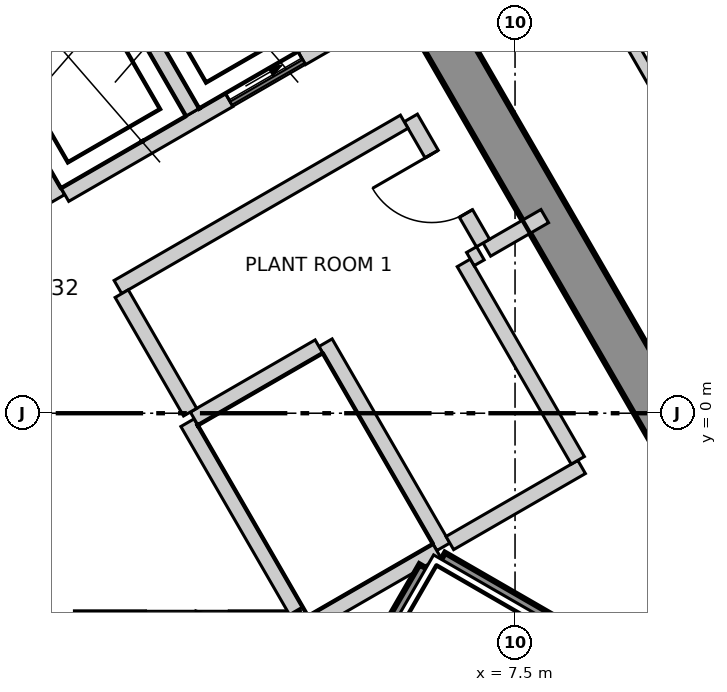
"""IFC4 building model, lengths in metres.
Left out: names, types, materials, properties, quantities, classifications, styles, units other than length and angle.
Written with IfcOpenShell. Run it as: python <this file> out.ifc"""

import sys

from ifc_helpers import new_model, si_unit, direction, frame, frame_2d, origin, place, context, subcontext, project, spatial, polyline, rectangle, outline, extrude, element, fill, save


model = new_model("IFC4")
c1 = context("Model", 3, precision=1e-05, world=origin(), true_north=direction((0.0, 1.0)))
c2 = subcontext(c1, "Body", "Model", "MODEL_VIEW")
j1 = project(units=[si_unit("LENGTHUNIT", "METRE"), si_unit("PLANEANGLEUNIT", "RADIAN")], contexts=[c1])
p1 = place(None, origin())
s1 = spatial("IfcSite", under=j1, at=p1, CompositionType="ELEMENT")
p2 = place(p1, origin())
s2 = spatial("IfcBuilding", under=s1, at=p2, CompositionType="ELEMENT")
p3 = place(p2, frame((0.0, 0.0, 268.3)))
s3 = spatial("IfcBuildingStorey", under=s2, at=p3, CompositionType="ELEMENT", Elevation=268.3)
p4 = place(p3, frame((12.384, -5.15, -0.3), z_axis=(0.0, 0.0, 1.0), x_axis=(-0.500000539815, 0.866025092122, 0.0)))
e1 = element("IfcWall", 1, at=p4, inside=s3, PredefinedType="SHEAR", context=c2, shape_type="SweptSolid", body=[
    extrude(outline(polyline([(-0.173, -0.301), (1.795, -0.301), (3.763, -0.301), (5.731, -0.301), (7.7, -0.301), (9.668, -0.301), (11.636, -0.301), (13.604, -0.3), (15.573, -0.3), (17.541, -0.3), (19.509, -0.3), (21.477, -0.3), (21.131, 0.3), (19.226, 0.3), (17.321, 0.3), (15.415, 0.3), (13.51, 0.3), (11.605, 0.3), (9.699, 0.3), (7.794, 0.3), (5.889, 0.3), (3.984, 0.3), (2.078, 0.3), (0.173, 0.3), (-0.173, -0.301)])), origin(), (0.0, 0.0, 1.0), 3.6),
])
p5 = place(p4, frame((15.627, 0.0, 0.3)))
e2 = element("IfcOpeningElement", 2, at=p5, cuts=e1, PredefinedType="OPENING", context=c2, shape_type="SweptSolid", body=[
    extrude(rectangle(XDim=0.9, YDim=2.1, at=frame_2d((0.45, 1.05))), frame((0.0, 0.31, 0.0), z_axis=(0.0, -1.0, 0.0), x_axis=(1.0, 0.0, 0.0)), (0.0, 0.0, 1.0), 0.621),
])
p6 = place(p4, frame((4.026, 0.0, 0.3)))
e3 = element("IfcOpeningElement", 3, at=p6, cuts=e1, PredefinedType="OPENING", context=c2, shape_type="SweptSolid", body=[
    extrude(rectangle(XDim=0.9, YDim=2.1, at=frame_2d((0.45, 1.05))), frame((0.0, 0.31, 0.0), z_axis=(0.0, -1.0, 0.0), x_axis=(1.0, 0.0, 0.0)), (0.0, 0.0, 1.0), 0.621),
])
p7 = place(p3, frame((26.205, -12.154, 0.0), z_axis=(0.0, 0.0, 1.0), x_axis=(-0.49999909388, 0.866025926932, 0.0)))
e4 = element("IfcWall", 4, at=p7, inside=s3, PredefinedType="ELEMENTEDWALL", context=c2, shape_type="SweptSolid", body=[
    extrude(rectangle(XDim=47.236, YDim=0.2, at=frame_2d((23.618, 0.0))), origin(), (0.0, 0.0, 1.0), 3.3),
])
p8 = place(p7, frame((2.243, 0.0, 0.9)))
e5 = element("IfcOpeningElement", 5, at=p8, cuts=e4, PredefinedType="OPENING", context=c2, shape_type="SweptSolid", body=[
    extrude(rectangle(XDim=3.7, YDim=2.2, at=frame_2d((1.85, 1.1))), frame((0.0, 0.11, 0.0), z_axis=(0.0, -1.0, 0.0), x_axis=(1.0, 0.0, 0.0)), (0.0, 0.0, 1.0), 0.22),
])
p9 = place(p7, frame((7.825, 0.0, 0.9)))
e6 = element("IfcOpeningElement", 6, at=p9, cuts=e4, PredefinedType="OPENING", context=c2, shape_type="SweptSolid", body=[
    extrude(rectangle(XDim=3.7, YDim=2.2, at=frame_2d((1.85, 1.1))), frame((0.0, 0.11, 0.0), z_axis=(0.0, -1.0, 0.0), x_axis=(1.0, 0.0, 0.0)), (0.0, 0.0, 1.0), 0.22),
])
p10 = place(p7, frame((13.406, 0.0, 0.9)))
e7 = element("IfcOpeningElement", 7, at=p10, cuts=e4, PredefinedType="OPENING", context=c2, shape_type="SweptSolid", body=[
    extrude(rectangle(XDim=3.7, YDim=2.2, at=frame_2d((1.85, 1.1))), frame((0.0, 0.11, 0.0), z_axis=(0.0, -1.0, 0.0), x_axis=(1.0, 0.0, 0.0)), (0.0, 0.0, 1.0), 0.22),
])
p11 = place(p7, frame((18.987, 0.0, 0.9)))
e8 = element("IfcOpeningElement", 8, at=p11, cuts=e4, PredefinedType="OPENING", context=c2, shape_type="SweptSolid", body=[
    extrude(rectangle(XDim=3.7, YDim=2.2, at=frame_2d((1.85, 1.1))), frame((0.0, 0.11, 0.0), z_axis=(0.0, -1.0, 0.0), x_axis=(1.0, 0.0, 0.0)), (0.0, 0.0, 1.0), 0.22),
])
p12 = place(p7, frame((24.569, 0.0, 0.9)))
e9 = element("IfcOpeningElement", 9, at=p12, cuts=e4, PredefinedType="OPENING", context=c2, shape_type="SweptSolid", body=[
    extrude(rectangle(XDim=3.7, YDim=2.2, at=frame_2d((1.85, 1.1))), frame((0.0, 0.11, 0.0), z_axis=(0.0, -1.0, 0.0), x_axis=(1.0, 0.0, 0.0)), (0.0, 0.0, 1.0), 0.22),
])
p13 = place(p7, frame((30.15, 0.0, 0.9)))
e10 = element("IfcOpeningElement", 10, at=p13, cuts=e4, PredefinedType="OPENING", context=c2, shape_type="SweptSolid", body=[
    extrude(rectangle(XDim=3.7, YDim=2.2, at=frame_2d((1.85, 1.1))), frame((0.0, 0.11, 0.0), z_axis=(0.0, -1.0, 0.0), x_axis=(1.0, 0.0, 0.0)), (0.0, 0.0, 1.0), 0.22),
])
p14 = place(p7, frame((35.732, 0.0, 0.9)))
e11 = element("IfcOpeningElement", 11, at=p14, cuts=e4, PredefinedType="OPENING", context=c2, shape_type="SweptSolid", body=[
    extrude(rectangle(XDim=3.7, YDim=2.2, at=frame_2d((1.85, 1.1))), frame((0.0, 0.11, 0.0), z_axis=(0.0, -1.0, 0.0), x_axis=(1.0, 0.0, 0.0)), (0.0, 0.0, 1.0), 0.22),
])
p15 = place(p7, frame((41.313, 0.0, 0.9)))
e12 = element("IfcOpeningElement", 12, at=p15, cuts=e4, PredefinedType="OPENING", context=c2, shape_type="SweptSolid", body=[
    extrude(rectangle(XDim=3.7, YDim=2.2, at=frame_2d((1.85, 1.1))), frame((0.0, 0.11, 0.0), z_axis=(0.0, -1.0, 0.0), x_axis=(1.0, 0.0, 0.0)), (0.0, 0.0, 1.0), 0.22),
])
p16 = place(p3, frame((0.075, 20.37, 0.0), z_axis=(0.0, 0.0, 1.0), x_axis=(0.499988971979, -0.866031770721, 0.0)))
e13 = element("IfcWall", 13, at=p16, inside=s3, PredefinedType="PARTITIONING", context=c2, shape_type="SweptSolid", body=[
    extrude(rectangle(XDim=35.207, YDim=0.15, at=frame_2d((17.604, 0.0))), origin(), (0.0, 0.0, 1.0), 3.3),
])
p17 = place(p16, frame((31.606, 0.0, 0.0)))
e14 = element("IfcOpeningElement", 14, at=p17, cuts=e13, PredefinedType="OPENING", context=c2, shape_type="SweptSolid", body=[
    extrude(rectangle(XDim=1.0, YDim=2.1, at=frame_2d((0.5, 1.05))), frame((0.0, 0.085, 0.0), z_axis=(0.0, -1.0, 0.0), x_axis=(1.0, 0.0, 0.0)), (0.0, 0.0, 1.0), 0.17),
])
p18 = place(p16, frame((24.316, 0.0, 0.0)))
e15 = element("IfcOpeningElement", 15, at=p18, cuts=e13, PredefinedType="OPENING", context=c2, shape_type="SweptSolid", body=[
    extrude(rectangle(XDim=1.0, YDim=2.1, at=frame_2d((0.5, 1.05))), frame((0.0, 0.085, 0.0), z_axis=(0.0, -1.0, 0.0), x_axis=(1.0, 0.0, 0.0)), (0.0, 0.0, 1.0), 0.17),
])
p19 = place(p16, frame((18.735, 0.0, 0.0)))
e16 = element("IfcOpeningElement", 16, at=p19, cuts=e13, PredefinedType="OPENING", context=c2, shape_type="SweptSolid", body=[
    extrude(rectangle(XDim=1.0, YDim=2.1, at=frame_2d((0.5, 1.05))), frame((0.0, 0.085, 0.0), z_axis=(0.0, -1.0, 0.0), x_axis=(1.0, 0.0, 0.0)), (0.0, 0.0, 1.0), 0.17),
])
p20 = place(p16, frame((8.154, 0.0, 0.0)))
e17 = element("IfcOpeningElement", 17, at=p20, cuts=e13, PredefinedType="OPENING", context=c2, shape_type="SweptSolid", body=[
    extrude(rectangle(XDim=1.0, YDim=2.1, at=frame_2d((0.5, 1.05))), frame((0.0, 0.085, 0.0), z_axis=(0.0, -1.0, 0.0), x_axis=(1.0, 0.0, 0.0)), (0.0, 0.0, 1.0), 0.17),
])
p21 = place(p16, frame((13.754, 0.0, 0.0)))
e18 = element("IfcOpeningElement", 18, at=p21, cuts=e13, PredefinedType="OPENING", context=c2, shape_type="SweptSolid", body=[
    extrude(rectangle(XDim=0.9, YDim=2.1, at=frame_2d((0.45, 1.05))), frame((0.0, 0.085, 0.0), z_axis=(0.0, -1.0, 0.0), x_axis=(1.0, 0.0, 0.0)), (0.0, 0.0, 1.0), 0.17),
])
p22 = place(p16, frame((11.554, 0.0, 0.0)))
e19 = element("IfcOpeningElement", 19, at=p22, cuts=e13, PredefinedType="OPENING", context=c2, shape_type="SweptSolid", body=[
    extrude(rectangle(XDim=0.9, YDim=2.1, at=frame_2d((0.45, 1.05))), frame((0.0, 0.085, 0.0), z_axis=(0.0, -1.0, 0.0), x_axis=(1.0, 0.0, 0.0)), (0.0, 0.0, 1.0), 0.17),
])
p23 = place(p16, frame((2.69, 0.0, 0.0)))
e20 = element("IfcOpeningElement", 20, at=p23, cuts=e13, PredefinedType="OPENING", context=c2, shape_type="SweptSolid", body=[
    extrude(rectangle(XDim=1.0, YDim=2.1, at=frame_2d((0.5, 1.05))), frame((0.0, 0.085, 0.0), z_axis=(0.0, -1.0, 0.0), x_axis=(1.0, 0.0, 0.0)), (0.0, 0.0, 1.0), 0.17),
])
p24 = place(p3, frame((1.703, -2.7, 0.0), z_axis=(0.0, 0.0, 1.0), x_axis=(1.0, 0.0, 0.0)))
e21 = element("IfcWall", 21, at=p24, inside=s3, PredefinedType="SOLIDWALL", context=c2, shape_type="SweptSolid", body=[
    extrude(rectangle(XDim=2.973, YDim=0.2, at=frame_2d((1.487, 0.0))), origin(), (0.0, 0.0, 1.0), 3.3),
])
p25 = place(p24, frame((0.936, 0.0, 0.0)))
e22 = element("IfcOpeningElement", 22, at=p25, cuts=e21, PredefinedType="OPENING", context=c2, shape_type="SweptSolid", body=[
    extrude(rectangle(XDim=1.1, YDim=2.1, at=frame_2d((0.55, 1.05))), frame((0.0, 0.11, 0.0), z_axis=(0.0, -1.0, 0.0), x_axis=(1.0, 0.0, 0.0)), (0.0, 0.0, 1.0), 0.22),
])
p26 = place(p3, frame((0.0, 5.4, 0.0), z_axis=(0.0, 0.0, 1.0), x_axis=(0.500103862429, -0.865965430478, 0.0)))
e23 = element("IfcWall", 23, at=p26, inside=s3, PredefinedType="SOLIDWALL", context=c2, shape_type="SweptSolid", body=[
    extrude(rectangle(XDim=2.973, YDim=0.2, at=frame_2d((1.487, 0.0))), origin(), (0.0, 0.0, 1.0), 3.3),
])
p27 = place(p26, frame((0.937, 0.0, 0.0)))
e24 = element("IfcOpeningElement", 24, at=p27, cuts=e23, PredefinedType="OPENING", context=c2, shape_type="SweptSolid", body=[
    extrude(rectangle(XDim=1.1, YDim=2.1, at=frame_2d((0.55, 1.05))), frame((0.0, 0.11, 0.0), z_axis=(0.0, -1.0, 0.0), x_axis=(1.0, 0.0, 0.0)), (0.0, 0.0, 1.0), 0.22),
])
p28 = place(p3, frame((3.19, -0.125, 0.0), z_axis=(0.0, 0.0, 1.0), x_axis=(0.499988658015, -0.866031951983, 0.0)))
e25 = element("IfcWall", 25, at=p28, inside=s3, PredefinedType="SOLIDWALL", context=c2, shape_type="SweptSolid", body=[
    extrude(rectangle(XDim=2.858, YDim=0.2, at=frame_2d((1.429, 0.0))), origin(), (0.0, 0.0, 1.0), 3.3),
])
p29 = place(p3, frame((1.578, 2.874, 0.0), z_axis=(0.0, 0.0, 1.0), x_axis=(0.866045911672, 0.499964477614, 0.0)))
e26 = element("IfcWall", 26, at=p29, inside=s3, PredefinedType="SOLIDWALL", context=c2, shape_type="SweptSolid", body=[
    extrude(rectangle(XDim=5.327, YDim=0.2, at=frame_2d((2.663, 0.0))), origin(), (0.0, 0.0, 1.0), 3.3),
])
p30 = place(p29, frame((2.496, 0.0, 0.0)))
e27 = element("IfcOpeningElement", 27, at=p30, cuts=e26, PredefinedType="OPENING", context=c2, shape_type="SweptSolid", body=[
    extrude(rectangle(XDim=1.1, YDim=2.1, at=frame_2d((0.55, 1.05))), frame((0.0, 0.11, 0.0), z_axis=(0.0, -1.0, 0.0), x_axis=(1.0, 0.0, 0.0)), (0.0, 0.0, 1.0), 0.22),
])
p31 = place(p3, frame((1.807, 6.47, 0.0), z_axis=(0.0, 0.0, 1.0), x_axis=(0.50012328804, -0.865954211699, 0.0)))
e28 = element("IfcWall", 28, at=p31, inside=s3, PredefinedType="SOLIDWALL", context=c2, shape_type="SweptSolid", body=[
    extrude(rectangle(XDim=2.9, YDim=0.2, at=frame_2d((1.45, 0.0))), origin(), (0.0, 0.0, 1.0), 3.3),
])
p32 = place(p3, frame((5.007, 0.928, 0.0), z_axis=(0.0, 0.0, 1.0), x_axis=(0.499899694197, -0.866083307622, 0.0)))
e29 = element("IfcWall", 29, at=p32, inside=s3, PredefinedType="SOLIDWALL", context=c2, shape_type="SweptSolid", body=[
    extrude(rectangle(XDim=3.1, YDim=0.2, at=frame_2d((1.55, 0.0))), origin(), (0.0, 0.0, 1.0), 3.3),
])
p33 = place(p3, frame((3.278, -0.071, 0.0), z_axis=(0.0, 0.0, 1.0), x_axis=(0.865784509405, 0.500417009377, 0.0)))
e30 = element("IfcWall", 30, at=p33, inside=s3, PredefinedType="SOLIDWALL", context=c2, shape_type="SweptSolid", body=[
    extrude(rectangle(XDim=1.896, YDim=0.2, at=frame_2d((0.948, 0.0))), origin(), (0.0, 0.0, 1.0), 3.3),
])
p34 = place(p3, frame((7.129, 2.153, 0.0), z_axis=(0.0, 0.0, 1.0), x_axis=(0.866083962871, 0.499898558967, 0.0)))
e31 = element("IfcWall", 31, at=p34, inside=s3, PredefinedType="SOLIDWALL", context=c2, shape_type="SweptSolid", body=[
    extrude(rectangle(XDim=0.88, YDim=0.2, at=frame_2d((0.44, 0.0))), origin(), (0.0, 0.0, 1.0), 3.3),
])
p35 = place(p3, frame((6.129, 3.885, 0.0), z_axis=(0.0, 0.0, 1.0), x_axis=(0.499952260202, -0.866052964615, 0.0)))
e32 = element("IfcWall", 32, at=p35, inside=s3, PredefinedType="SOLIDWALL", context=c2, shape_type="SweptSolid", body=[
    extrude(rectangle(XDim=1.901, YDim=0.2, at=frame_2d((0.95, 0.0))), origin(), (0.0, 0.0, 1.0), 3.3),
])
p36 = place(p35, frame((0.55, 0.0, 0.0)))
e33 = element("IfcOpeningElement", 33, at=p36, cuts=e32, PredefinedType="OPENING", context=c2, shape_type="SweptSolid", body=[
    extrude(rectangle(XDim=0.9, YDim=2.1, at=frame_2d((0.45, 1.05))), frame((0.0, 0.11, 0.0), z_axis=(0.0, -1.0, 0.0), x_axis=(1.0, 0.0, 0.0)), (0.0, 0.0, 1.0), 0.22),
])
p37 = place(p3, frame((2.275, 1.66, 0.0), z_axis=(0.0, 0.0, 1.0), x_axis=(0.866013608182, 0.500020430026, 0.0)))
e34 = element("IfcWall", 34, at=p37, inside=s3, PredefinedType="SOLIDWALL", context=c2, shape_type="SweptSolid", body=[
    extrude(rectangle(XDim=4.35, YDim=0.2, at=frame_2d((2.175, 0.0))), origin(), (0.0, 0.0, 1.0), 3.3),
])
p38 = place(p3, frame((2.325, 1.573, 0.0), z_axis=(0.0, 0.0, 1.0), x_axis=(0.500004188491, -0.866022985545, 0.0)))
e35 = element("IfcWall", 35, at=p38, inside=s3, PredefinedType="SOLIDWALL", context=c2, shape_type="SweptSolid", body=[
    extrude(rectangle(XDim=1.8, YDim=0.2, at=frame_2d((0.9, 0.0))), origin(), (0.0, 0.0, 1.0), 3.3),
])
p39 = place(p3, frame((4.9, -2.714, 0.0), z_axis=(0.0, 0.0, 1.0), x_axis=(0.865846928409, 0.500309001083, 0.0)))
e36 = element("IfcWall", 36, at=p39, inside=s3, PredefinedType="SOLIDWALL", context=c2, shape_type="SweptSolid", body=[
    extrude(rectangle(XDim=1.813, YDim=0.2, at=frame_2d((0.907, 0.0))), origin(), (0.0, 0.0, 1.0), 3.3),
])
p40 = place(p3, frame((6.642, -1.708, 0.0), z_axis=(0.0, 0.0, 1.0), x_axis=(0.866043441391, 0.499968756647, 0.0)))
e37 = element("IfcWall", 37, at=p40, inside=s3, PredefinedType="SOLIDWALL", context=c2, shape_type="SweptSolid", body=[
    extrude(rectangle(XDim=2.002, YDim=0.2, at=frame_2d((1.001, 0.0))), origin(), (0.0, 0.0, 1.0), 3.3),
])
p41 = place(p3, frame((6.826, 1.978, 0.0), z_axis=(0.0, 0.0, 1.0), x_axis=(0.499990139034, -0.866031096941, 0.0)))
e38 = element("IfcWall", 38, at=p41, inside=s3, PredefinedType="SOLIDWALL", context=c2, shape_type="SweptSolid", body=[
    extrude(rectangle(XDim=3.0, YDim=0.2, at=frame_2d((1.5, 0.0))), origin(), (0.0, 0.0, 1.0), 3.3),
])
p42 = place(p3, frame((6.912, 2.028, 0.0), z_axis=(0.0, 0.0, 1.0), x_axis=(0.866559367082, 0.499074005857, 0.0)))
e39 = element("IfcWall", 39, at=p42, inside=s3, PredefinedType="SOLIDWALL", context=c2, shape_type="SweptSolid", body=[
    extrude(rectangle(XDim=0.152, YDim=0.2, at=frame_2d((0.076, 0.0))), origin(), (0.0, 0.0, 1.0), 3.3),
])
p43 = place(p3, frame((4.929, -4.462, 0.0), z_axis=(0.0, 0.0, 1.0), x_axis=(0.500200581029, 0.865909567298, 0.0)))
e40 = element("IfcWall", 40, at=p43, inside=s3, PredefinedType="SOLIDWALL", context=c2, shape_type="SweptSolid", body=[
    extrude(rectangle(XDim=2.799, YDim=0.2, at=frame_2d((1.399, 0.0))), origin(), (0.0, 0.0, 1.0), 3.3),
])
p44 = place(p3, frame((6.529, -1.922, 0.0), z_axis=(0.0, 0.0, 1.0), x_axis=(0.866068467981, -0.499925403204, 0.0)))
e41 = element("IfcWall", 41, at=p44, inside=s3, PredefinedType="SOLIDWALL", context=c2, shape_type="SweptSolid", body=[
    extrude(rectangle(XDim=6.665, YDim=0.2, at=frame_2d((3.332, 0.0))), origin(), (0.0, 0.0, 1.0), 3.3),
])
p45 = place(p30, origin())
e42 = element("IfcDoor", 42, at=p45, inside=s3, OperationType="SLIDING_TO_LEFT", PredefinedType="DOOR", context=c2, shape_type="SweptSolid", body=[
    extrude(rectangle(XDim=1.1, YDim=2.1, at=frame_2d((0.55, 1.05))), frame((0.0, 0.025, 0.0), z_axis=(0.0, -1.0, 0.0), x_axis=(1.0, 0.0, 0.0)), (0.0, 0.0, 1.0), 0.05),
])
fill(e27, e42)
p46 = place(p36, origin())
e43 = element("IfcDoor", 43, at=p46, inside=s3, OperationType="SINGLE_SWING_LEFT", PredefinedType="DOOR", context=c2, shape_type="SweptSolid", body=[
    extrude(rectangle(XDim=0.9, YDim=2.1, at=frame_2d((0.45, 1.05))), frame((0.0, 0.025, 0.0), z_axis=(0.0, -1.0, 0.0), x_axis=(1.0, 0.0, 0.0)), (0.0, 0.0, 1.0), 0.05),
])
fill(e33, e43)
save(model, sys.argv[1])
